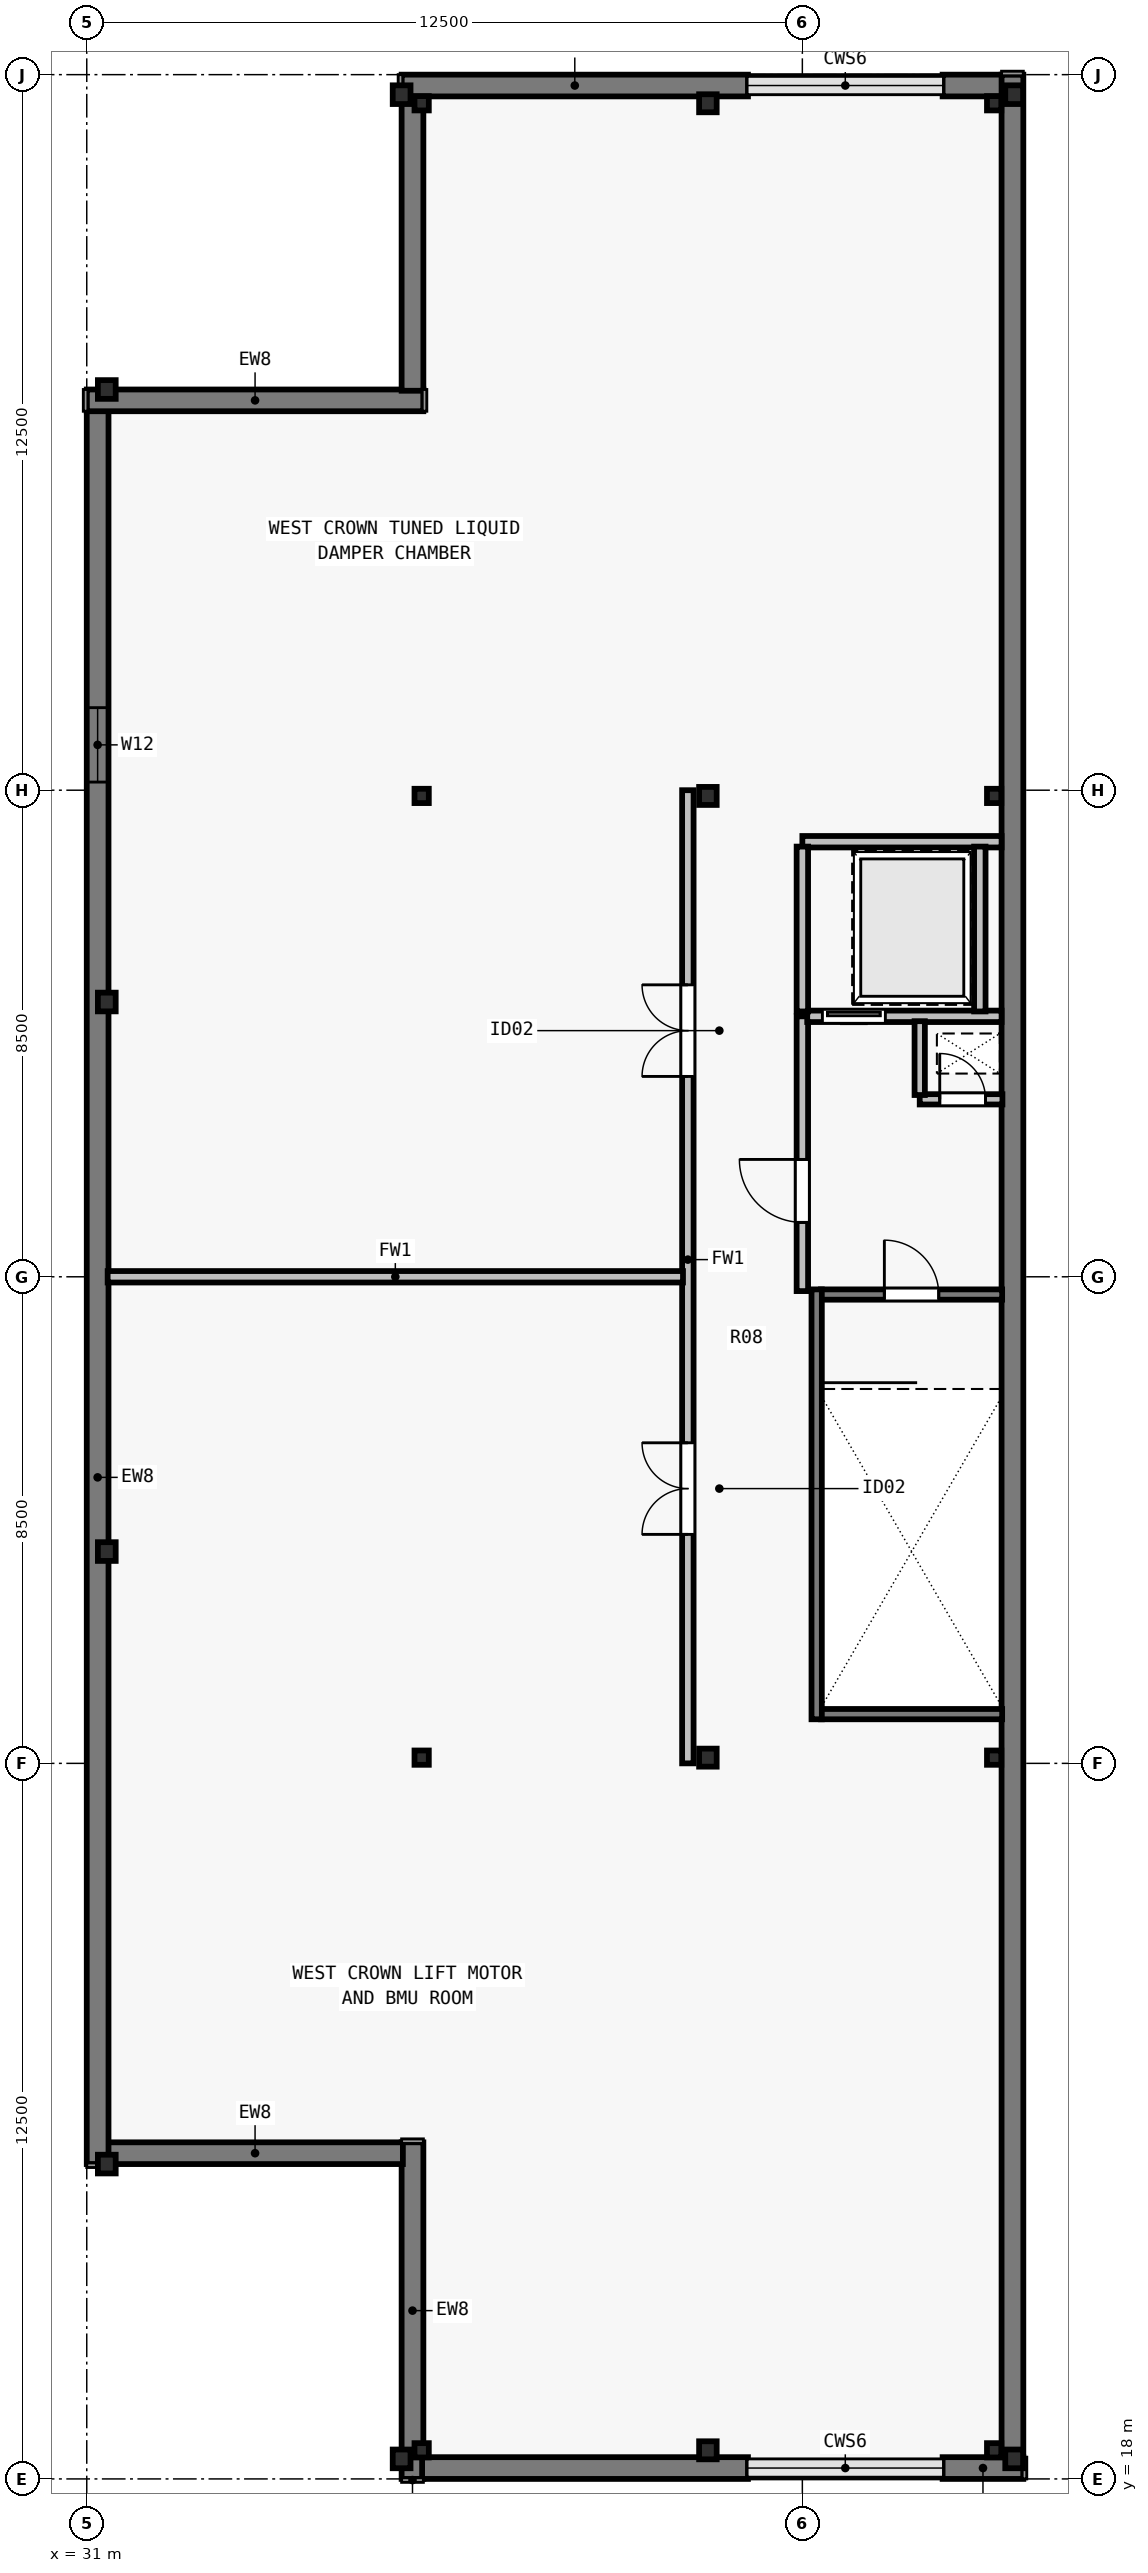
"""IFC4 building model, lengths in metres.
Left out: names, types, materials, properties, quantities, classifications, styles, units other than length and angle.
Written with IfcOpenShell. Run it as: python <this file> out.ifc"""

import sys

from ifc_helpers import new_model, si_unit, direction, frame, frame_2d, origin, origin_2d, place, context, subcontext, project, spatial, rectangle, i_section, extrude, element, fill, save


model = new_model("IFC4")
c1 = context("Model", 3, precision=1e-05, world=origin(), true_north=direction((0.0, 1.0)))
c2 = subcontext(c1, "Body", "Model", "MODEL_VIEW")
j1 = project(units=[si_unit("LENGTHUNIT", "METRE"), si_unit("PLANEANGLEUNIT", "RADIAN")], contexts=[c1])
p1 = place(None, origin())
s1 = spatial("IfcSite", under=j1, at=p1, CompositionType="ELEMENT")
p2 = place(p1, origin())
s2 = spatial("IfcBuilding", under=s1, at=p2, CompositionType="ELEMENT")
p3 = place(p2, frame((0.0, 0.0, 330.0)))
s3 = spatial("IfcBuildingStorey", under=s2, at=p3, CompositionType="ELEMENT", Elevation=330.0)
for number, where, z_axis, x_axis in (
    (1, (36.5, 18.35, 0.0), (0.0, 0.0, 1.0), (1.0, 0.0, 0.0)),
    (2, (47.2, 18.35, 0.0), (0.0, 0.0, 1.0), (1.0, 0.0, 0.0)),
    (3, (47.2, 59.65, 0.0), (0.0, 0.0, 1.0), (1.0, 0.0, 0.0)),
    (4, (36.5, 59.65, 0.0), (0.0, 0.0, 1.0), (1.0, 0.0, 0.0)),
    (5, (31.35, 54.5, 0.0), (0.0, 0.0, 1.0), (1.0, 0.0, 0.0)),
    (6, (31.35, 43.8, 0.0), (0.0, 0.0, 1.0), (1.0, 0.0, 0.0)),
    (7, (31.35, 34.2, 0.0), (0.0, 0.0, 1.0), (1.0, 0.0, 0.0)),
    (8, (31.35, 23.5, 0.0), (0.0, 0.0, 1.0), (1.0, 0.0, 0.0)),
):
    element("IfcColumn", number, at=place(p3, frame(where, z_axis=z_axis, x_axis=x_axis)), inside=s3, PredefinedType="COLUMN", context=c2, shape_type="SweptSolid", body=[
        extrude(i_section(OverallWidth=0.311, OverallDepth=0.327, WebThickness=0.016, FlangeThickness=0.025, FilletRadius=0.016, at=origin_2d()), origin(), (0.0, 0.0, 1.0), 5.5),
    ])
p4 = place(p3, frame((41.85, 18.5, 0.0), z_axis=(0.0, 0.0, 1.0), x_axis=(1.0, 0.0, 0.0)))
e9 = element("IfcColumn", 9, at=p4, inside=s3, PredefinedType="COLUMN", context=c2, shape_type="SweptSolid", body=[
    extrude(i_section(OverallWidth=0.307, OverallDepth=0.315, WebThickness=0.012, FlangeThickness=0.019, FilletRadius=0.016, at=origin_2d()), origin(), (0.0, 0.0, 1.0), 5.5),
])
for number, where, z_axis, x_axis in (
    (10, (36.85, 18.5, 0.0), (0.0, 0.0, 1.0), (1.0, 0.0, 0.0)),
    (11, (46.85, 18.5, 0.0), (0.0, 0.0, 1.0), (1.0, 0.0, 0.0)),
):
    element("IfcColumn", number, at=place(p3, frame(where, z_axis=z_axis, x_axis=x_axis)), inside=s3, PredefinedType="PILASTER", context=c2, shape_type="SweptSolid", body=[
        extrude(i_section(OverallWidth=0.203, OverallDepth=0.203, WebThickness=0.009, FlangeThickness=0.014, FilletRadius=0.01, at=origin_2d()), origin(), (0.0, 0.0, 1.0), 5.5),
    ])
p5 = place(p3, frame((41.85, 30.6, 0.0), z_axis=(0.0, 0.0, 1.0), x_axis=(1.0, 0.0, 0.0)))
e12 = element("IfcColumn", 12, at=p5, inside=s3, PredefinedType="COLUMN", context=c2, shape_type="SweptSolid", body=[
    extrude(i_section(OverallWidth=0.307, OverallDepth=0.315, WebThickness=0.012, FlangeThickness=0.019, FilletRadius=0.016, at=origin_2d()), origin(), (0.0, 0.0, 1.0), 5.5),
])
for number, where, z_axis, x_axis in (
    (13, (36.85, 30.6, 0.0), (0.0, 0.0, 1.0), (1.0, 0.0, 0.0)),
    (14, (46.85, 30.6, 0.0), (0.0, 0.0, 1.0), (1.0, 0.0, 0.0)),
):
    element("IfcColumn", number, at=place(p3, frame(where, z_axis=z_axis, x_axis=x_axis)), inside=s3, PredefinedType="PILASTER", context=c2, shape_type="SweptSolid", body=[
        extrude(i_section(OverallWidth=0.203, OverallDepth=0.203, WebThickness=0.009, FlangeThickness=0.014, FilletRadius=0.01, at=origin_2d()), origin(), (0.0, 0.0, 1.0), 5.5),
    ])
p6 = place(p3, frame((41.85, 47.4, 0.0), z_axis=(0.0, 0.0, 1.0), x_axis=(1.0, 0.0, 0.0)))
e15 = element("IfcColumn", 15, at=p6, inside=s3, PredefinedType="COLUMN", context=c2, shape_type="SweptSolid", body=[
    extrude(i_section(OverallWidth=0.307, OverallDepth=0.315, WebThickness=0.012, FlangeThickness=0.019, FilletRadius=0.016, at=origin_2d()), origin(), (0.0, 0.0, 1.0), 5.5),
])
for number, where, z_axis, x_axis in (
    (16, (36.85, 47.4, 0.0), (0.0, 0.0, 1.0), (1.0, 0.0, 0.0)),
    (17, (46.85, 47.4, 0.0), (0.0, 0.0, 1.0), (1.0, 0.0, 0.0)),
):
    element("IfcColumn", number, at=place(p3, frame(where, z_axis=z_axis, x_axis=x_axis)), inside=s3, PredefinedType="PILASTER", context=c2, shape_type="SweptSolid", body=[
        extrude(i_section(OverallWidth=0.203, OverallDepth=0.203, WebThickness=0.009, FlangeThickness=0.014, FilletRadius=0.01, at=origin_2d()), origin(), (0.0, 0.0, 1.0), 5.5),
    ])
p7 = place(p3, frame((41.85, 59.5, 0.0), z_axis=(0.0, 0.0, 1.0), x_axis=(1.0, 0.0, 0.0)))
e18 = element("IfcColumn", 18, at=p7, inside=s3, PredefinedType="COLUMN", context=c2, shape_type="SweptSolid", body=[
    extrude(i_section(OverallWidth=0.307, OverallDepth=0.315, WebThickness=0.012, FlangeThickness=0.019, FilletRadius=0.016, at=origin_2d()), origin(), (0.0, 0.0, 1.0), 5.5),
])
for number, where, z_axis, x_axis in (
    (19, (36.85, 59.5, 0.0), (0.0, 0.0, 1.0), (1.0, 0.0, 0.0)),
    (20, (46.85, 59.5, 0.0), (0.0, 0.0, 1.0), (1.0, 0.0, 0.0)),
):
    element("IfcColumn", number, at=place(p3, frame(where, z_axis=z_axis, x_axis=x_axis)), inside=s3, PredefinedType="PILASTER", context=c2, shape_type="SweptSolid", body=[
        extrude(i_section(OverallWidth=0.203, OverallDepth=0.203, WebThickness=0.009, FlangeThickness=0.014, FilletRadius=0.01, at=origin_2d()), origin(), (0.0, 0.0, 1.0), 5.5),
    ])
p8 = place(p3, frame((36.69, 18.0, 0.0), z_axis=(0.0, 0.0, 1.0), x_axis=(0.0, 1.0, 0.0)))
e21 = element("IfcWall", 21, at=p8, inside=s3, PredefinedType="SOLIDWALL", context=c2, shape_type="SweptSolid", body=[
    extrude(rectangle(XDim=5.88, YDim=0.38, at=frame_2d((2.94, 0.0))), origin(), (0.0, 0.0, 1.0), 5.25),
])
p9 = place(p3, frame((36.522, 23.69, 0.0), z_axis=(0.0, 0.0, 1.0), x_axis=(-1.0, 0.0, 0.0)))
e22 = element("IfcWall", 22, at=p9, inside=s3, PredefinedType="SOLIDWALL", context=c2, shape_type="SweptSolid", body=[
    extrude(rectangle(XDim=5.164, YDim=0.38, at=frame_2d((2.582, 0.0))), origin(), (0.0, 0.0, 1.0), 5.25),
])
p10 = place(p3, frame((31.19, 23.5, 0.0), z_axis=(0.0, 0.0, 1.0), x_axis=(0.0, 1.0, 0.0)))
e23 = element("IfcWall", 23, at=p10, inside=s3, PredefinedType="SOLIDWALL", context=c2, shape_type="SweptSolid", body=[
    extrude(rectangle(XDim=30.642, YDim=0.38, at=frame_2d((15.321, 0.0))), origin(), (0.0, 0.0, 1.0), 5.25),
])
p11 = place(p10, frame((24.142, 0.0, 0.8)))
e24 = element("IfcOpeningElement", 24, at=p11, cuts=e23, PredefinedType="OPENING", context=c2, shape_type="SweptSolid", body=[
    extrude(rectangle(XDim=1.3, YDim=2.05, at=frame_2d((0.65, 1.025))), frame((0.0, 0.2, 0.0), z_axis=(0.0, -1.0, 0.0), x_axis=(1.0, 0.0, 0.0)), (0.0, 0.0, 1.0), 0.4),
])
p12 = place(p3, frame((31.0, 54.31, 0.0), z_axis=(0.0, 0.0, 1.0), x_axis=(1.0, 0.0, 0.0)))
e25 = element("IfcWall", 25, at=p12, inside=s3, PredefinedType="SOLIDWALL", context=c2, shape_type="SweptSolid", body=[
    extrude(rectangle(XDim=5.88, YDim=0.38, at=frame_2d((2.94, 0.0))), origin(), (0.0, 0.0, 1.0), 5.25),
])
p13 = place(p3, frame((36.69, 54.478, 0.0), z_axis=(0.0, 0.0, 1.0), x_axis=(0.0, 1.0, 0.0)))
e26 = element("IfcWall", 26, at=p13, inside=s3, PredefinedType="SOLIDWALL", context=c2, shape_type="SweptSolid", body=[
    extrude(rectangle(XDim=5.164, YDim=0.38, at=frame_2d((2.582, 0.0))), origin(), (0.0, 0.0, 1.0), 5.25),
])
p14 = place(p3, frame((36.5, 59.81, 0.0), z_axis=(0.0, 0.0, 1.0), x_axis=(1.0, 0.0, 0.0)))
e27 = element("IfcWall", 27, at=p14, inside=s3, PredefinedType="SOLIDWALL", context=c2, shape_type="SweptSolid", body=[
    extrude(rectangle(XDim=6.05, YDim=0.38, at=frame_2d((3.025, 0.0))), origin(), (0.0, 0.0, 1.0), 5.25),
])
p15 = place(p3, frame((45.95, 59.81, 0.0), z_axis=(0.0, 0.0, 1.0), x_axis=(1.0, 0.0, 0.0)))
e28 = element("IfcWall", 28, at=p15, inside=s3, PredefinedType="SOLIDWALL", context=c2, shape_type="SweptSolid", body=[
    extrude(rectangle(XDim=1.052, YDim=0.38, at=frame_2d((0.526, 0.0))), origin(), (0.0, 0.0, 1.0), 5.25),
])
p16 = place(p3, frame((47.17, 60.0, 0.0), z_axis=(0.0, 0.0, 1.0), x_axis=(0.0, -1.0, 0.0)))
e29 = element("IfcWall", 29, at=p16, inside=s3, PredefinedType="SOLIDWALL", context=c2, shape_type="SweptSolid", body=[
    extrude(rectangle(XDim=41.642, YDim=0.38, at=frame_2d((20.821, 0.0))), origin(), (0.0, 0.0, 1.0), 5.25),
])
p17 = place(p3, frame((47.36, 18.19, 0.0), z_axis=(0.0, 0.0, 1.0), x_axis=(-1.0, 0.0, 0.0)))
e30 = element("IfcWall", 30, at=p17, inside=s3, PredefinedType="SOLIDWALL", context=c2, shape_type="SweptSolid", body=[
    extrude(rectangle(XDim=1.41, YDim=0.38, at=frame_2d((0.705, 0.0))), origin(), (0.0, 0.0, 1.0), 5.25),
])
p18 = place(p3, frame((42.55, 18.19, 0.0), z_axis=(0.0, 0.0, 1.0), x_axis=(-1.0, 0.0, 0.0)))
e31 = element("IfcWall", 31, at=p18, inside=s3, PredefinedType="SOLIDWALL", context=c2, shape_type="SweptSolid", body=[
    extrude(rectangle(XDim=5.692, YDim=0.38, at=frame_2d((2.846, 0.0))), origin(), (0.0, 0.0, 1.0), 5.25),
])
p19 = place(p3, frame((43.5, 38.75, 0.0), z_axis=(0.0, 0.0, 1.0), x_axis=(0.0, 1.0, 0.0)))
e32 = element("IfcWall", 32, at=p19, inside=s3, PredefinedType="SOLIDWALL", context=c2, shape_type="SweptSolid", body=[
    extrude(rectangle(XDim=4.8, YDim=0.2, at=frame_2d((2.4, 0.0))), origin(), (0.0, 0.0, 1.0), 5.25),
])
p20 = place(p19, frame((1.2, 0.0, 0.0)))
e33 = element("IfcOpeningElement", 33, at=p20, cuts=e32, PredefinedType="OPENING", context=c2, shape_type="SweptSolid", body=[
    extrude(rectangle(XDim=1.1, YDim=2.15, at=frame_2d((0.55, 1.075))), frame((0.0, 0.11, 0.0), z_axis=(0.0, -1.0, 0.0), x_axis=(1.0, 0.0, 0.0)), (0.0, 0.0, 1.0), 0.22),
])
p21 = place(p3, frame((43.585, 43.55, 0.0), z_axis=(0.0, 0.0, 1.0), x_axis=(1.0, 0.0, 0.0)))
e34 = element("IfcWall", 34, at=p21, inside=s3, PredefinedType="SOLIDWALL", context=c2, shape_type="SweptSolid", body=[
    extrude(rectangle(XDim=3.395, YDim=0.2, at=frame_2d((1.698, 0.0))), origin(), (0.0, 0.0, 1.0), 5.25),
])
p22 = place(p21, frame((0.265, 0.0, 0.0)))
e35 = element("IfcOpeningElement", 35, at=p22, cuts=e34, PredefinedType="OPENING", context=c2, shape_type="SweptSolid", body=[
    extrude(rectangle(XDim=1.1, YDim=2.2, at=frame_2d((0.55, 1.1))), frame((0.0, 0.11, 0.0), z_axis=(0.0, -1.0, 0.0), x_axis=(1.0, 0.0, 0.0)), (0.0, 0.0, 1.0), 0.22),
])
p23 = place(p3, frame((43.5, 46.6, 0.0), z_axis=(0.0, 0.0, 1.0), x_axis=(1.0, 0.0, 0.0)))
e36 = element("IfcWall", 36, at=p23, inside=s3, PredefinedType="SOLIDWALL", context=c2, shape_type="SweptSolid", body=[
    extrude(rectangle(XDim=3.48, YDim=0.2, at=frame_2d((1.74, 0.0))), origin(), (0.0, 0.0, 1.0), 5.25),
])
for number, where, z_axis, x_axis in (
    (37, (46.6, 43.635, 0.0), (0.0, 0.0, 1.0), (0.0, 1.0, 0.0)),
    (38, (43.5, 43.635, 0.0), (0.0, 0.0, 1.0), (0.0, 1.0, 0.0)),
):
    element("IfcWall", number, at=place(p3, frame(where, z_axis=z_axis, x_axis=x_axis)), inside=s3, PredefinedType="SOLIDWALL", context=c2, shape_type="SweptSolid", body=[
        extrude(rectangle(XDim=2.88, YDim=0.2, at=frame_2d((1.44, 0.0))), origin(), (0.0, 0.0, 1.0), 5.25),
    ])
p24 = place(p3, frame((45.55, 42.1, 0.0), z_axis=(0.0, 0.0, 1.0), x_axis=(1.0, 0.0, 0.0)))
e39 = element("IfcWall", 39, at=p24, inside=s3, PredefinedType="SOLIDWALL", context=c2, shape_type="SweptSolid", body=[
    extrude(rectangle(XDim=1.445, YDim=0.18, at=frame_2d((0.723, 0.0))), origin(), (0.0, 0.0, 1.0), 5.25),
])
p25 = place(p24, frame((0.35, 0.0, 0.0)))
e40 = element("IfcOpeningElement", 40, at=p25, cuts=e39, PredefinedType="OPENING", context=c2, shape_type="SweptSolid", body=[
    extrude(rectangle(XDim=0.8, YDim=2.08, at=frame_2d((0.4, 1.04))), frame((0.0, 0.1, 0.0), z_axis=(0.0, -1.0, 0.0), x_axis=(1.0, 0.0, 0.0)), (0.0, 0.0, 1.0), 0.2),
])
p26 = place(p3, frame((45.55, 42.175, 0.0), z_axis=(0.0, 0.0, 1.0), x_axis=(0.0, 1.0, 0.0)))
e41 = element("IfcWall", 41, at=p26, inside=s3, PredefinedType="SOLIDWALL", context=c2, shape_type="SweptSolid", body=[
    extrude(rectangle(XDim=1.29, YDim=0.18, at=frame_2d((0.645, 0.0))), origin(), (0.0, 0.0, 1.0), 5.25),
])
p27 = place(p3, frame((41.5, 30.5, 0.0), z_axis=(0.0, 0.0, 1.0), x_axis=(0.0, 1.0, 0.0)))
e42 = element("IfcWall", 42, at=p27, inside=s3, PredefinedType="SOLIDWALL", context=c2, shape_type="SweptSolid", body=[
    extrude(rectangle(XDim=17.0, YDim=0.2, at=frame_2d((8.5, 0.0))), origin(), (0.0, 0.0, 1.0), 5.25),
])
p28 = place(p27, frame((4.0, 0.0, 0.0)))
e43 = element("IfcOpeningElement", 43, at=p28, cuts=e42, PredefinedType="OPENING", context=c2, shape_type="SweptSolid", body=[
    extrude(rectangle(XDim=1.6, YDim=2.2, at=frame_2d((0.8, 1.1))), frame((0.0, 0.11, 0.0), z_axis=(0.0, -1.0, 0.0), x_axis=(1.0, 0.0, 0.0)), (0.0, 0.0, 1.0), 0.22),
])
p29 = place(p27, frame((12.0, 0.0, 0.0)))
e44 = element("IfcOpeningElement", 44, at=p29, cuts=e42, PredefinedType="OPENING", context=c2, shape_type="SweptSolid", body=[
    extrude(rectangle(XDim=1.6, YDim=2.2, at=frame_2d((0.8, 1.1))), frame((0.0, 0.11, 0.0), z_axis=(0.0, -1.0, 0.0), x_axis=(1.0, 0.0, 0.0)), (0.0, 0.0, 1.0), 0.22),
])
p30 = place(p3, frame((31.365, 39.0, 0.0), z_axis=(0.0, 0.0, 1.0), x_axis=(1.0, 0.0, 0.0)))
e45 = element("IfcWall", 45, at=p30, inside=s3, PredefinedType="SOLIDWALL", context=c2, shape_type="SweptSolid", body=[
    extrude(rectangle(XDim=10.05, YDim=0.2, at=frame_2d((5.025, 0.0))), origin(), (0.0, 0.0, 1.0), 5.25),
])
p31 = place(p3, frame((43.825, 38.69, 0.0), z_axis=(0.0, 0.0, 1.0), x_axis=(1.0, 0.0, 0.0)))
e46 = element("IfcWall", 46, at=p31, inside=s3, PredefinedType="SOLIDWALL", context=c2, shape_type="SweptSolid", body=[
    extrude(rectangle(XDim=3.165, YDim=0.18, at=frame_2d((1.583, 0.0))), origin(), (0.0, 0.0, 1.0), 5.25),
])
p32 = place(p31, frame((1.107, 0.0, 0.0)))
e47 = element("IfcOpeningElement", 47, at=p32, cuts=e46, PredefinedType="OPENING", context=c2, shape_type="SweptSolid", body=[
    extrude(rectangle(XDim=0.95, YDim=2.15, at=frame_2d((0.475, 1.075))), frame((0.0, 0.1, 0.0), z_axis=(0.0, -1.0, 0.0), x_axis=(1.0, 0.0, 0.0)), (0.0, 0.0, 1.0), 0.2),
])
p33 = place(p3, frame((43.825, 31.36, 0.0), z_axis=(0.0, 0.0, 1.0), x_axis=(1.0, 0.0, 0.0)))
e48 = element("IfcWall", 48, at=p33, inside=s3, PredefinedType="SOLIDWALL", context=c2, shape_type="SweptSolid", body=[
    extrude(rectangle(XDim=3.165, YDim=0.18, at=frame_2d((1.583, 0.0))), origin(), (0.0, 0.0, 1.0), 5.25),
])
p34 = place(p3, frame((43.75, 38.78, 0.0), z_axis=(0.0, 0.0, 1.0), x_axis=(0.0, -1.0, 0.0)))
e49 = element("IfcWall", 49, at=p34, inside=s3, PredefinedType="SOLIDWALL", context=c2, shape_type="SweptSolid", body=[
    extrude(rectangle(XDim=7.51, YDim=0.18, at=frame_2d((3.755, 0.0))), origin(), (0.0, 0.0, 1.0), 5.25),
])
p35 = place(p11, origin())
e50 = element("IfcWindow", 50, at=p35, inside=s3, PartitioningType="SINGLE_PANEL", PredefinedType="WINDOW", context=c2, shape_type="SweptSolid", body=[
    extrude(rectangle(XDim=1.3, YDim=2.05, at=frame_2d((0.65, 1.025))), frame((0.0, -0.05, 0.0), z_axis=(0.0, -1.0, 0.0), x_axis=(1.0, 0.0, 0.0)), (0.0, 0.0, 1.0), 0.06),
])
fill(e24, e50)
p36 = place(p25, origin())
e51 = element("IfcDoor", 51, at=p36, inside=s3, OperationType="SINGLE_SWING_LEFT", PredefinedType="DOOR", context=c2, shape_type="SweptSolid", body=[
    extrude(rectangle(XDim=0.8, YDim=2.08, at=frame_2d((0.4, 1.04))), frame((0.0, 0.025, 0.0), z_axis=(0.0, -1.0, 0.0), x_axis=(1.0, 0.0, 0.0)), (0.0, 0.0, 1.0), 0.05),
])
fill(e40, e51)
p37 = place(p20, origin())
e52 = element("IfcDoor", 52, at=p37, inside=s3, OperationType="SINGLE_SWING_RIGHT", PredefinedType="DOOR", context=c2, shape_type="SweptSolid", body=[
    extrude(rectangle(XDim=1.1, YDim=2.15, at=frame_2d((0.55, 1.075))), frame((0.0, 0.025, 0.0), z_axis=(0.0, -1.0, 0.0), x_axis=(1.0, 0.0, 0.0)), (0.0, 0.0, 1.0), 0.05),
])
fill(e33, e52)
p38 = place(p22, origin())
e53 = element("IfcDoor", 53, at=p38, inside=s3, OperationType="SLIDING_TO_LEFT", PredefinedType="DOOR", context=c2, shape_type="SweptSolid", body=[
    extrude(rectangle(XDim=1.1, YDim=2.2, at=frame_2d((0.55, 1.1))), frame((0.0, 0.025, 0.0), z_axis=(0.0, -1.0, 0.0), x_axis=(1.0, 0.0, 0.0)), (0.0, 0.0, 1.0), 0.05),
])
fill(e35, e53)
p39 = place(p28, origin())
e54 = element("IfcDoor", 54, at=p39, inside=s3, OperationType="DOUBLE_DOOR_SINGLE_SWING", PredefinedType="DOOR", context=c2, shape_type="SweptSolid", body=[
    extrude(rectangle(XDim=1.6, YDim=2.2, at=frame_2d((0.8, 1.1))), frame((0.0, 0.025, 0.0), z_axis=(0.0, -1.0, 0.0), x_axis=(1.0, 0.0, 0.0)), (0.0, 0.0, 1.0), 0.05),
])
fill(e43, e54)
p40 = place(p29, origin())
e55 = element("IfcDoor", 55, at=p40, inside=s3, OperationType="DOUBLE_DOOR_SINGLE_SWING", PredefinedType="DOOR", context=c2, shape_type="SweptSolid", body=[
    extrude(rectangle(XDim=1.6, YDim=2.2, at=frame_2d((0.8, 1.1))), frame((0.0, 0.025, 0.0), z_axis=(0.0, -1.0, 0.0), x_axis=(1.0, 0.0, 0.0)), (0.0, 0.0, 1.0), 0.05),
])
fill(e44, e55)
p41 = place(p32, origin())
e56 = element("IfcDoor", 56, at=p41, inside=s3, OperationType="SINGLE_SWING_LEFT", PredefinedType="DOOR", context=c2, shape_type="SweptSolid", body=[
    extrude(rectangle(XDim=0.95, YDim=2.15, at=frame_2d((0.475, 1.075))), frame((0.0, 0.025, 0.0), z_axis=(0.0, -1.0, 0.0), x_axis=(1.0, 0.0, 0.0)), (0.0, 0.0, 1.0), 0.05),
])
fill(e47, e56)
save(model, sys.argv[1])
